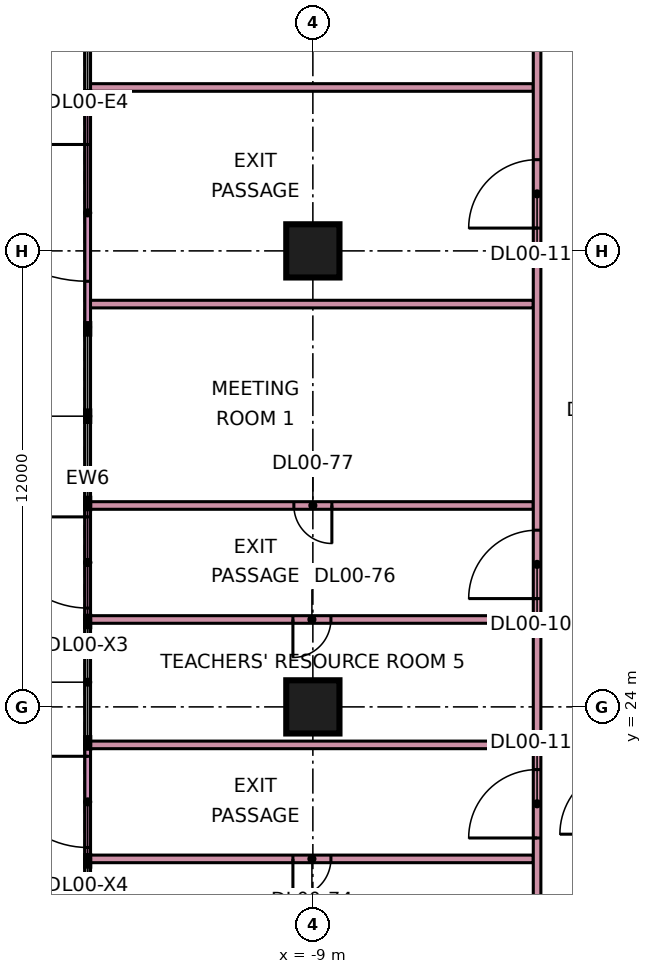
"""IFC4 building model, lengths in metres.
Left out: names, types, materials, properties, quantities, classifications, styles, units other than length and angle.
Written with IfcOpenShell. Run it as: python <this file> out.ifc"""

import sys

from ifc_helpers import new_model, si_unit, direction, frame, frame_2d, origin, origin_2d, place, context, subcontext, project, spatial, rectangle, extrude, element, fill, save


model = new_model("IFC4")
c1 = context("Model", 3, precision=1e-05, world=origin(), true_north=direction((0.0, 1.0)))
c2 = subcontext(c1, "Body", "Model", "MODEL_VIEW")
j1 = project(units=[si_unit("LENGTHUNIT", "METRE"), si_unit("PLANEANGLEUNIT", "RADIAN")], contexts=[c1])
p1 = place(None, origin())
s1 = spatial("IfcSite", under=j1, at=p1, CompositionType="ELEMENT")
p2 = place(p1, origin())
s2 = spatial("IfcBuilding", under=s1, at=p2, CompositionType="ELEMENT")
p3 = place(p2, origin())
s3 = spatial("IfcBuildingStorey", under=s2, at=p3, CompositionType="ELEMENT", Elevation=0.0)
for number, where, z_axis, x_axis in (
    (1, (-9.0, 24.0, 0.0), (0.0, 0.0, 1.0), (1.0, 0.0, 0.0)),
    (2, (-9.0, 36.0, 0.0), (0.0, 0.0, 1.0), (1.0, 0.0, 0.0)),
):
    element("IfcColumn", number, at=place(p3, frame(where, z_axis=z_axis, x_axis=x_axis)), inside=s3, PredefinedType="COLUMN", context=c2, shape_type="SweptSolid", body=[
        extrude(rectangle(XDim=1.4, YDim=1.4, at=origin_2d()), origin(), (0.0, 0.0, 1.0), 7.2),
    ])
p4 = place(p3, frame((-14.925, 40.0, 0.0), z_axis=(0.0, 0.0, 1.0), x_axis=(0.0, -1.0, 0.0)))
e3 = element("IfcWall", 3, at=p4, inside=s3, PredefinedType="SOLIDWALL", context=c2, shape_type="SweptSolid", body=[
    extrude(rectangle(XDim=6.0, YDim=0.15, at=frame_2d((3.0, 0.0))), origin(), (0.0, 0.0, 1.0), 6.8),
])
p5 = place(p4, frame((1.2, 0.0, 0.0)))
e4 = element("IfcOpeningElement", 4, at=p5, cuts=e3, PredefinedType="OPENING", context=c2, shape_type="SweptSolid", body=[
    extrude(rectangle(XDim=3.6, YDim=2.8, at=frame_2d((1.8, 1.4))), frame((0.0, 0.085, 0.0), z_axis=(0.0, -1.0, 0.0), x_axis=(1.0, 0.0, 0.0)), (0.0, 0.0, 1.0), 0.17),
])
p6 = place(p3, frame((-14.925, 29.3, 0.0), z_axis=(0.0, 0.0, 1.0), x_axis=(0.0, -1.0, 0.0)))
e5 = element("IfcWall", 5, at=p6, inside=s3, PredefinedType="SOLIDWALL", context=c2, shape_type="SweptSolid", body=[
    extrude(rectangle(XDim=3.0, YDim=0.15, at=frame_2d((1.5, 0.0))), origin(), (0.0, 0.0, 1.0), 6.8),
])
p7 = place(p6, frame((0.3, 0.0, 0.0)))
e6 = element("IfcOpeningElement", 6, at=p7, cuts=e5, PredefinedType="OPENING", context=c2, shape_type="SweptSolid", body=[
    extrude(rectangle(XDim=2.4, YDim=2.4, at=frame_2d((1.2, 1.2))), frame((0.0, 0.085, 0.0), z_axis=(0.0, -1.0, 0.0), x_axis=(1.0, 0.0, 0.0)), (0.0, 0.0, 1.0), 0.17),
])
p8 = place(p3, frame((-14.925, 23.0, 0.0), z_axis=(0.0, 0.0, 1.0), x_axis=(0.0, -1.0, 0.0)))
e7 = element("IfcWall", 7, at=p8, inside=s3, PredefinedType="SOLIDWALL", context=c2, shape_type="SweptSolid", body=[
    extrude(rectangle(XDim=3.0, YDim=0.15, at=frame_2d((1.5, 0.0))), origin(), (0.0, 0.0, 1.0), 6.8),
])
p9 = place(p8, frame((0.3, 0.0, 0.0)))
e8 = element("IfcOpeningElement", 8, at=p9, cuts=e7, PredefinedType="OPENING", context=c2, shape_type="SweptSolid", body=[
    extrude(rectangle(XDim=2.4, YDim=2.4, at=frame_2d((1.2, 1.2))), frame((0.0, 0.085, 0.0), z_axis=(0.0, -1.0, 0.0), x_axis=(1.0, 0.0, 0.0)), (0.0, 0.0, 1.0), 0.17),
])
p10 = place(p3, frame((-14.925, 20.0, 0.0), z_axis=(0.0, 0.0, 1.0), x_axis=(1.0, 0.0, 0.0)))
e9 = element("IfcWall", 9, at=p10, inside=s3, PredefinedType="PARTITIONING", context=c2, shape_type="SweptSolid", body=[
    extrude(rectangle(XDim=11.725, YDim=0.2, at=frame_2d((5.863, 0.0))), origin(), (0.0, 0.0, 1.0), 6.8),
])
p11 = place(p10, frame((5.4, 0.0, 0.0)))
e10 = element("IfcOpeningElement", 10, at=p11, cuts=e9, PredefinedType="OPENING", context=c2, shape_type="SweptSolid", body=[
    extrude(rectangle(XDim=1.0, YDim=2.1, at=frame_2d((0.5, 1.05))), frame((0.0, 0.11, 0.0), z_axis=(0.0, -1.0, 0.0), x_axis=(1.0, 0.0, 0.0)), (0.0, 0.0, 1.0), 0.22),
])
p12 = place(p3, frame((-14.925, 23.0, 0.0), z_axis=(0.0, 0.0, 1.0), x_axis=(1.0, 0.0, 0.0)))
e11 = element("IfcWall", 11, at=p12, inside=s3, PredefinedType="PARTITIONING", context=c2, shape_type="SweptSolid", body=[
    extrude(rectangle(XDim=11.725, YDim=0.2, at=frame_2d((5.863, 0.0))), origin(), (0.0, 0.0, 1.0), 6.8),
])
p13 = place(p3, frame((-14.925, 26.3, 0.0), z_axis=(0.0, 0.0, 1.0), x_axis=(1.0, 0.0, 0.0)))
e12 = element("IfcWall", 12, at=p13, inside=s3, PredefinedType="PARTITIONING", context=c2, shape_type="SweptSolid", body=[
    extrude(rectangle(XDim=11.725, YDim=0.2, at=frame_2d((5.863, 0.0))), origin(), (0.0, 0.0, 1.0), 6.8),
])
p14 = place(p13, frame((5.4, 0.0, 0.0)))
e13 = element("IfcOpeningElement", 13, at=p14, cuts=e12, PredefinedType="OPENING", context=c2, shape_type="SweptSolid", body=[
    extrude(rectangle(XDim=1.0, YDim=2.1, at=frame_2d((0.5, 1.05))), frame((0.0, 0.11, 0.0), z_axis=(0.0, -1.0, 0.0), x_axis=(1.0, 0.0, 0.0)), (0.0, 0.0, 1.0), 0.22),
])
p15 = place(p3, frame((-14.925, 29.3, 0.0), z_axis=(0.0, 0.0, 1.0), x_axis=(1.0, 0.0, 0.0)))
e14 = element("IfcWall", 14, at=p15, inside=s3, PredefinedType="PARTITIONING", context=c2, shape_type="SweptSolid", body=[
    extrude(rectangle(XDim=11.725, YDim=0.2, at=frame_2d((5.863, 0.0))), origin(), (0.0, 0.0, 1.0), 6.8),
])
p16 = place(p15, frame((5.425, 0.0, 0.0)))
e15 = element("IfcOpeningElement", 15, at=p16, cuts=e14, PredefinedType="OPENING", context=c2, shape_type="SweptSolid", body=[
    extrude(rectangle(XDim=1.0, YDim=2.1, at=frame_2d((0.5, 1.05))), frame((0.0, 0.11, 0.0), z_axis=(0.0, -1.0, 0.0), x_axis=(1.0, 0.0, 0.0)), (0.0, 0.0, 1.0), 0.22),
])
p17 = place(p3, frame((-14.925, 40.3, 0.0), z_axis=(0.0, 0.0, 1.0), x_axis=(1.0, 0.0, 0.0)))
e16 = element("IfcWall", 16, at=p17, inside=s3, PredefinedType="PARTITIONING", context=c2, shape_type="SweptSolid", body=[
    extrude(rectangle(XDim=11.725, YDim=0.2, at=frame_2d((5.863, 0.0))), origin(), (0.0, 0.0, 1.0), 6.8),
])
p18 = place(p3, frame((-14.851, 34.6, 0.0), z_axis=(0.0, 0.0, 1.0), x_axis=(1.0, 0.0, 0.0)))
e17 = element("IfcWall", 17, at=p18, inside=s3, PredefinedType="PARTITIONING", context=c2, shape_type="SweptSolid", body=[
    extrude(rectangle(XDim=11.651, YDim=0.2, at=frame_2d((5.826, 0.0))), origin(), (0.0, 0.0, 1.0), 6.8),
])
p19 = place(p3, frame((-3.1, -3.0, 0.0), z_axis=(0.0, 0.0, 1.0), x_axis=(0.0, 1.0, 0.0)))
e18 = element("IfcWall", 18, at=p19, inside=s3, PredefinedType="PARTITIONING", context=c2, shape_type="SweptSolid", body=[
    extrude(rectangle(XDim=69.1, YDim=0.2, at=frame_2d((34.55, 0.0))), origin(), (0.0, 0.0, 1.0), 6.8),
])
p20 = place(p19, frame((8.6, 0.0, 0.0)))
e19 = element("IfcOpeningElement", 19, at=p20, cuts=e18, PredefinedType="OPENING", context=c2, shape_type="SweptSolid", body=[
    extrude(rectangle(XDim=1.0, YDim=2.1, at=frame_2d((0.5, 1.05))), frame((0.0, 0.11, 0.0), z_axis=(0.0, -1.0, 0.0), x_axis=(1.0, 0.0, 0.0)), (0.0, 0.0, 1.0), 0.22),
])
p21 = place(p19, frame((13.85, 0.0, 0.0)))
e20 = element("IfcOpeningElement", 20, at=p21, cuts=e18, PredefinedType="OPENING", context=c2, shape_type="SweptSolid", body=[
    extrude(rectangle(XDim=1.0, YDim=2.1, at=frame_2d((0.5, 1.05))), frame((0.0, 0.11, 0.0), z_axis=(0.0, -1.0, 0.0), x_axis=(1.0, 0.0, 0.0)), (0.0, 0.0, 1.0), 0.22),
])
p22 = place(p19, frame((18.6, 0.0, 0.0)))
e21 = element("IfcOpeningElement", 21, at=p22, cuts=e18, PredefinedType="OPENING", context=c2, shape_type="SweptSolid", body=[
    extrude(rectangle(XDim=1.0, YDim=2.1, at=frame_2d((0.5, 1.05))), frame((0.0, 0.11, 0.0), z_axis=(0.0, -1.0, 0.0), x_axis=(1.0, 0.0, 0.0)), (0.0, 0.0, 1.0), 0.22),
])
p23 = place(p19, frame((66.95, 0.0, 0.0)))
e22 = element("IfcOpeningElement", 22, at=p23, cuts=e18, PredefinedType="OPENING", context=c2, shape_type="SweptSolid", body=[
    extrude(rectangle(XDim=1.0, YDim=2.1, at=frame_2d((0.5, 1.05))), frame((0.0, 0.11, 0.0), z_axis=(0.0, -1.0, 0.0), x_axis=(1.0, 0.0, 0.0)), (0.0, 0.0, 1.0), 0.22),
])
p24 = place(p19, frame((59.85, 0.0, 0.0)))
e23 = element("IfcOpeningElement", 23, at=p24, cuts=e18, PredefinedType="OPENING", context=c2, shape_type="SweptSolid", body=[
    extrude(rectangle(XDim=1.8, YDim=2.1, at=frame_2d((0.9, 1.05))), frame((0.0, 0.11, 0.0), z_axis=(0.0, -1.0, 0.0), x_axis=(1.0, 0.0, 0.0)), (0.0, 0.0, 1.0), 0.22),
])
p25 = place(p19, frame((49.85, 0.0, 0.0)))
e24 = element("IfcOpeningElement", 24, at=p25, cuts=e18, PredefinedType="OPENING", context=c2, shape_type="SweptSolid", body=[
    extrude(rectangle(XDim=1.8, YDim=2.1, at=frame_2d((0.9, 1.05))), frame((0.0, 0.11, 0.0), z_axis=(0.0, -1.0, 0.0), x_axis=(1.0, 0.0, 0.0)), (0.0, 0.0, 1.0), 0.22),
])
p26 = place(p19, frame((29.85, 0.0, 0.0)))
e25 = element("IfcOpeningElement", 25, at=p26, cuts=e18, PredefinedType="OPENING", context=c2, shape_type="SweptSolid", body=[
    extrude(rectangle(XDim=1.8, YDim=2.1, at=frame_2d((0.9, 1.05))), frame((0.0, 0.11, 0.0), z_axis=(0.0, -1.0, 0.0), x_axis=(1.0, 0.0, 0.0)), (0.0, 0.0, 1.0), 0.22),
])
p27 = place(p19, frame((39.6, 0.0, 0.0)))
e26 = element("IfcOpeningElement", 26, at=p27, cuts=e18, PredefinedType="OPENING", context=c2, shape_type="SweptSolid", body=[
    extrude(rectangle(XDim=1.8, YDim=2.1, at=frame_2d((0.9, 1.05))), frame((0.0, 0.11, 0.0), z_axis=(0.0, -1.0, 0.0), x_axis=(1.0, 0.0, 0.0)), (0.0, 0.0, 1.0), 0.22),
])
p28 = place(p19, frame((23.55, 0.0, 0.0)))
e27 = element("IfcOpeningElement", 27, at=p28, cuts=e18, PredefinedType="OPENING", context=c2, shape_type="SweptSolid", body=[
    extrude(rectangle(XDim=1.8, YDim=2.1, at=frame_2d((0.9, 1.05))), frame((0.0, 0.11, 0.0), z_axis=(0.0, -1.0, 0.0), x_axis=(1.0, 0.0, 0.0)), (0.0, 0.0, 1.0), 0.22),
])
p29 = place(p5, frame((3.6, 0.0, 0.0), z_axis=(0.0, 0.0, 1.0), x_axis=(-1.0, 0.0, 0.0)))
e28 = element("IfcDoor", 28, at=p29, inside=s3, OperationType="DOUBLE_DOOR_SINGLE_SWING", PredefinedType="DOOR", context=c2, shape_type="SweptSolid", body=[
    extrude(rectangle(XDim=3.6, YDim=2.8, at=frame_2d((1.8, 1.4))), frame((0.0, 0.025, 0.0), z_axis=(0.0, -1.0, 0.0), x_axis=(1.0, 0.0, 0.0)), (0.0, 0.0, 1.0), 0.05),
])
fill(e4, e28)
p30 = place(p7, frame((2.4, 0.0, 0.0), z_axis=(0.0, 0.0, 1.0), x_axis=(-1.0, 0.0, 0.0)))
e29 = element("IfcDoor", 29, at=p30, inside=s3, OperationType="DOUBLE_DOOR_SINGLE_SWING", PredefinedType="DOOR", context=c2, shape_type="SweptSolid", body=[
    extrude(rectangle(XDim=2.4, YDim=2.4, at=frame_2d((1.2, 1.2))), frame((0.0, 0.025, 0.0), z_axis=(0.0, -1.0, 0.0), x_axis=(1.0, 0.0, 0.0)), (0.0, 0.0, 1.0), 0.05),
])
fill(e6, e29)
p31 = place(p9, frame((2.4, 0.0, 0.0), z_axis=(0.0, 0.0, 1.0), x_axis=(-1.0, 0.0, 0.0)))
e30 = element("IfcDoor", 30, at=p31, inside=s3, OperationType="DOUBLE_DOOR_SINGLE_SWING", PredefinedType="DOOR", context=c2, shape_type="SweptSolid", body=[
    extrude(rectangle(XDim=2.4, YDim=2.4, at=frame_2d((1.2, 1.2))), frame((0.0, 0.025, 0.0), z_axis=(0.0, -1.0, 0.0), x_axis=(1.0, 0.0, 0.0)), (0.0, 0.0, 1.0), 0.05),
])
fill(e8, e30)
p32 = place(p11, frame((1.0, 0.0, 0.0), z_axis=(0.0, 0.0, 1.0), x_axis=(-1.0, 0.0, 0.0)))
e31 = element("IfcDoor", 31, at=p32, inside=s3, OperationType="SINGLE_SWING_LEFT", PredefinedType="DOOR", context=c2, shape_type="SweptSolid", body=[
    extrude(rectangle(XDim=1.0, YDim=2.1, at=frame_2d((0.5, 1.05))), frame((0.0, 0.025, 0.0), z_axis=(0.0, -1.0, 0.0), x_axis=(1.0, 0.0, 0.0)), (0.0, 0.0, 1.0), 0.05),
])
fill(e10, e31)
p33 = place(p14, frame((1.0, 0.0, 0.0), z_axis=(0.0, 0.0, 1.0), x_axis=(-1.0, 0.0, 0.0)))
e32 = element("IfcDoor", 32, at=p33, inside=s3, OperationType="SINGLE_SWING_LEFT", PredefinedType="DOOR", context=c2, shape_type="SweptSolid", body=[
    extrude(rectangle(XDim=1.0, YDim=2.1, at=frame_2d((0.5, 1.05))), frame((0.0, 0.025, 0.0), z_axis=(0.0, -1.0, 0.0), x_axis=(1.0, 0.0, 0.0)), (0.0, 0.0, 1.0), 0.05),
])
fill(e13, e32)
p34 = place(p16, origin())
e33 = element("IfcDoor", 33, at=p34, inside=s3, OperationType="SINGLE_SWING_RIGHT", PredefinedType="DOOR", context=c2, shape_type="SweptSolid", body=[
    extrude(rectangle(XDim=1.0, YDim=2.1, at=frame_2d((0.5, 1.05))), frame((0.0, 0.025, 0.0), z_axis=(0.0, -1.0, 0.0), x_axis=(1.0, 0.0, 0.0)), (0.0, 0.0, 1.0), 0.05),
])
fill(e15, e33)
p35 = place(p26, origin())
e34 = element("IfcDoor", 34, at=p35, inside=s3, OperationType="DOUBLE_DOOR_SINGLE_SWING", PredefinedType="DOOR", context=c2, shape_type="SweptSolid", body=[
    extrude(rectangle(XDim=1.8, YDim=2.1, at=frame_2d((0.9, 1.05))), frame((0.0, 0.025, 0.0), z_axis=(0.0, -1.0, 0.0), x_axis=(1.0, 0.0, 0.0)), (0.0, 0.0, 1.0), 0.05),
])
fill(e25, e34)
p36 = place(p27, origin())
e35 = element("IfcDoor", 35, at=p36, inside=s3, OperationType="DOUBLE_DOOR_SINGLE_SWING", PredefinedType="DOOR", context=c2, shape_type="SweptSolid", body=[
    extrude(rectangle(XDim=1.8, YDim=2.1, at=frame_2d((0.9, 1.05))), frame((0.0, 0.025, 0.0), z_axis=(0.0, -1.0, 0.0), x_axis=(1.0, 0.0, 0.0)), (0.0, 0.0, 1.0), 0.05),
])
fill(e26, e35)
p37 = place(p28, origin())
e36 = element("IfcDoor", 36, at=p37, inside=s3, OperationType="DOUBLE_DOOR_SINGLE_SWING", PredefinedType="DOOR", context=c2, shape_type="SweptSolid", body=[
    extrude(rectangle(XDim=1.8, YDim=2.1, at=frame_2d((0.9, 1.05))), frame((0.0, 0.025, 0.0), z_axis=(0.0, -1.0, 0.0), x_axis=(1.0, 0.0, 0.0)), (0.0, 0.0, 1.0), 0.05),
])
fill(e27, e36)
save(model, sys.argv[1])
